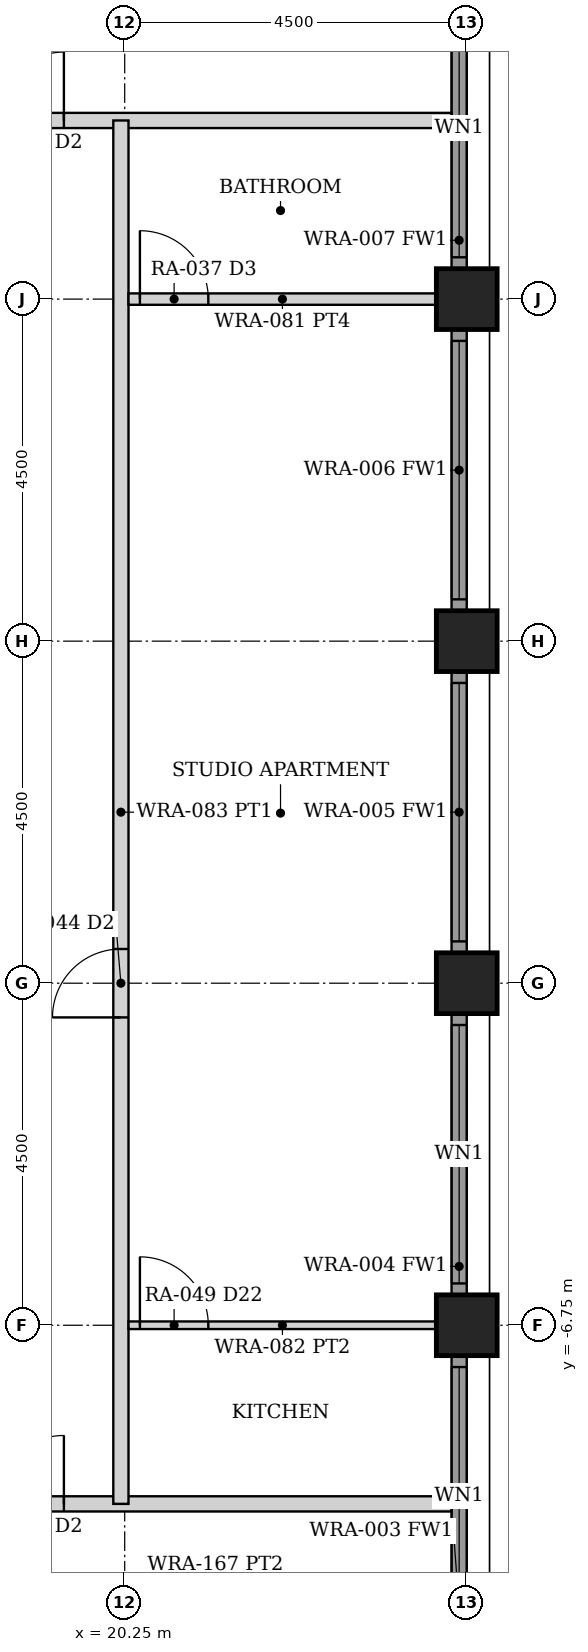
"""IFC4 building model, lengths in metres.
Left out: names, types, materials, properties, quantities, classifications, styles, units other than length and angle.
Written with IfcOpenShell. Run it as: python <this file> out.ifc"""

import sys

from ifc_helpers import new_model, si_unit, direction, frame, frame_2d, origin, origin_2d, place, context, subcontext, project, spatial, rectangle, hollow_rectangle, extrude, element, fill, save


model = new_model("IFC4")
c1 = context("Model", 3, precision=1e-05, world=origin(), true_north=direction((0.0, 1.0)))
c2 = subcontext(c1, "Body", "Model", "MODEL_VIEW")
j1 = project(units=[si_unit("LENGTHUNIT", "METRE"), si_unit("PLANEANGLEUNIT", "RADIAN")], contexts=[c1])
p1 = place(None, origin())
s1 = spatial("IfcSite", under=j1, at=p1, CompositionType="ELEMENT")
p2 = place(p1, origin())
s2 = spatial("IfcBuilding", under=s1, at=p2, CompositionType="ELEMENT")
p3 = place(p2, frame((0.0, 0.0, 30.0)))
s3 = spatial("IfcBuildingStorey", under=s2, at=p3, CompositionType="ELEMENT", Elevation=30.0)
for number, where, z_axis, x_axis in (
    (1, (24.75, -6.75, 0.0), (0.0, 0.0, 1.0), (1.0, 0.0, 0.0)),
    (2, (24.75, -2.25, 0.0), (0.0, 0.0, 1.0), (1.0, 0.0, 0.0)),
    (3, (24.75, 2.25, 0.0), (0.0, 0.0, 1.0), (1.0, 0.0, 0.0)),
    (4, (24.75, 6.75, 0.0), (0.0, 0.0, 1.0), (1.0, 0.0, 0.0)),
):
    element("IfcColumn", number, at=place(p3, frame(where, z_axis=z_axis, x_axis=x_axis)), inside=s3, PredefinedType="COLUMN", context=c2, shape_type="SweptSolid", body=[
        extrude(hollow_rectangle(XDim=0.8, YDim=0.8, WallThickness=0.08, at=origin_2d()), origin(), (0.0, 0.0, 1.0), 3.5),
    ])
p4 = place(p3, frame((24.65, -10.845, 0.0), z_axis=(0.0, 0.0, 1.0), x_axis=(0.0, 1.0, 0.0)))
e5 = element("IfcWall", 5, at=p4, inside=s3, PredefinedType="SOLIDWALL", context=c2, shape_type="SweptSolid", body=[
    extrude(rectangle(XDim=3.69, YDim=0.2, at=frame_2d((1.845, 0.0))), origin(), (0.0, 0.0, 1.0), 2.379),
])
p5 = place(p4, frame((0.145, 0.0, 0.3)))
e6 = element("IfcOpeningElement", 6, at=p5, cuts=e5, PredefinedType="OPENING", context=c2, shape_type="SweptSolid", body=[
    extrude(rectangle(XDim=3.4, YDim=1.929, at=frame_2d((1.7, 0.964))), frame((0.0, 0.11, 0.0), z_axis=(0.0, -1.0, 0.0), x_axis=(1.0, 0.0, 0.0)), (0.0, 0.0, 1.0), 0.22),
])
p6 = place(p3, frame((24.65, -6.345, 0.0), z_axis=(0.0, 0.0, 1.0), x_axis=(0.0, 1.0, 0.0)))
e7 = element("IfcWall", 7, at=p6, inside=s3, PredefinedType="SOLIDWALL", context=c2, shape_type="SweptSolid", body=[
    extrude(rectangle(XDim=3.69, YDim=0.2, at=frame_2d((1.845, 0.0))), origin(), (0.0, 0.0, 1.0), 2.379),
])
p7 = place(p6, frame((0.145, 0.0, 0.3)))
e8 = element("IfcOpeningElement", 8, at=p7, cuts=e7, PredefinedType="OPENING", context=c2, shape_type="SweptSolid", body=[
    extrude(rectangle(XDim=3.4, YDim=1.929, at=frame_2d((1.7, 0.964))), frame((0.0, 0.11, 0.0), z_axis=(0.0, -1.0, 0.0), x_axis=(1.0, 0.0, 0.0)), (0.0, 0.0, 1.0), 0.22),
])
p8 = place(p3, frame((24.65, -1.845, 0.0), z_axis=(0.0, 0.0, 1.0), x_axis=(0.0, 1.0, 0.0)))
e9 = element("IfcWall", 9, at=p8, inside=s3, PredefinedType="SOLIDWALL", context=c2, shape_type="SweptSolid", body=[
    extrude(rectangle(XDim=3.69, YDim=0.2, at=frame_2d((1.845, 0.0))), origin(), (0.0, 0.0, 1.0), 2.379),
])
p9 = place(p8, frame((0.145, 0.0, 0.3)))
e10 = element("IfcOpeningElement", 10, at=p9, cuts=e9, PredefinedType="OPENING", context=c2, shape_type="SweptSolid", body=[
    extrude(rectangle(XDim=3.4, YDim=1.929, at=frame_2d((1.7, 0.964))), frame((0.0, 0.11, 0.0), z_axis=(0.0, -1.0, 0.0), x_axis=(1.0, 0.0, 0.0)), (0.0, 0.0, 1.0), 0.22),
])
p10 = place(p3, frame((24.65, 2.655, 0.0), z_axis=(0.0, 0.0, 1.0), x_axis=(0.0, 1.0, 0.0)))
e11 = element("IfcWall", 11, at=p10, inside=s3, PredefinedType="SOLIDWALL", context=c2, shape_type="SweptSolid", body=[
    extrude(rectangle(XDim=3.69, YDim=0.2, at=frame_2d((1.845, 0.0))), origin(), (0.0, 0.0, 1.0), 2.379),
])
p11 = place(p10, frame((0.145, 0.0, 0.3)))
e12 = element("IfcOpeningElement", 12, at=p11, cuts=e11, PredefinedType="OPENING", context=c2, shape_type="SweptSolid", body=[
    extrude(rectangle(XDim=3.4, YDim=1.929, at=frame_2d((1.7, 0.964))), frame((0.0, 0.11, 0.0), z_axis=(0.0, -1.0, 0.0), x_axis=(1.0, 0.0, 0.0)), (0.0, 0.0, 1.0), 0.22),
])
p12 = place(p3, frame((24.65, 7.155, 0.0), z_axis=(0.0, 0.0, 1.0), x_axis=(0.0, 1.0, 0.0)))
e13 = element("IfcWall", 13, at=p12, inside=s3, PredefinedType="SOLIDWALL", context=c2, shape_type="SweptSolid", body=[
    extrude(rectangle(XDim=3.69, YDim=0.2, at=frame_2d((1.845, 0.0))), origin(), (0.0, 0.0, 1.0), 2.379),
])
p13 = place(p12, frame((0.145, 0.0, 0.3)))
e14 = element("IfcOpeningElement", 14, at=p13, cuts=e13, PredefinedType="OPENING", context=c2, shape_type="SweptSolid", body=[
    extrude(rectangle(XDim=3.4, YDim=1.929, at=frame_2d((1.7, 0.964))), frame((0.0, 0.11, 0.0), z_axis=(0.0, -1.0, 0.0), x_axis=(1.0, 0.0, 0.0)), (0.0, 0.0, 1.0), 0.22),
])
p14 = place(p3, frame((-24.55, 9.1, 0.0), z_axis=(0.0, 0.0, 1.0), x_axis=(1.0, 0.0, 0.0)))
e15 = element("IfcWall", 15, at=p14, inside=s3, PredefinedType="PARTITIONING", context=c2, shape_type="SweptSolid", body=[
    extrude(rectangle(XDim=49.1, YDim=0.2, at=frame_2d((24.55, 0.0))), origin(), (0.0, 0.0, 1.0), 2.373),
])
p15 = place(p14, frame((5.1, 0.0, 0.0)))
e16 = element("IfcOpeningElement", 16, at=p15, cuts=e15, PredefinedType="OPENING", context=c2, shape_type="SweptSolid", body=[
    extrude(rectangle(XDim=0.9, YDim=2.1, at=frame_2d((0.45, 1.05))), frame((0.0, 0.11, 0.0), z_axis=(0.0, -1.0, 0.0), x_axis=(1.0, 0.0, 0.0)), (0.0, 0.0, 1.0), 0.22),
])
p16 = place(p14, frame((9.0, 0.0, 0.0)))
e17 = element("IfcOpeningElement", 17, at=p16, cuts=e15, PredefinedType="OPENING", context=c2, shape_type="SweptSolid", body=[
    extrude(rectangle(XDim=0.9, YDim=2.1, at=frame_2d((0.45, 1.05))), frame((0.0, 0.11, 0.0), z_axis=(0.0, -1.0, 0.0), x_axis=(1.0, 0.0, 0.0)), (0.0, 0.0, 1.0), 0.22),
])
p17 = place(p14, frame((13.5, 0.0, 0.0)))
e18 = element("IfcOpeningElement", 18, at=p17, cuts=e15, PredefinedType="OPENING", context=c2, shape_type="SweptSolid", body=[
    extrude(rectangle(XDim=0.9, YDim=2.1, at=frame_2d((0.45, 1.05))), frame((0.0, 0.11, 0.0), z_axis=(0.0, -1.0, 0.0), x_axis=(1.0, 0.0, 0.0)), (0.0, 0.0, 1.0), 0.22),
])
p18 = place(p14, frame((18.0, 0.0, 0.0)))
e19 = element("IfcOpeningElement", 19, at=p18, cuts=e15, PredefinedType="OPENING", context=c2, shape_type="SweptSolid", body=[
    extrude(rectangle(XDim=0.9, YDim=2.1, at=frame_2d((0.45, 1.05))), frame((0.0, 0.11, 0.0), z_axis=(0.0, -1.0, 0.0), x_axis=(1.0, 0.0, 0.0)), (0.0, 0.0, 1.0), 0.22),
])
p19 = place(p14, frame((22.5, 0.0, 0.0)))
e20 = element("IfcOpeningElement", 20, at=p19, cuts=e15, PredefinedType="OPENING", context=c2, shape_type="SweptSolid", body=[
    extrude(rectangle(XDim=0.9, YDim=2.1, at=frame_2d((0.45, 1.05))), frame((0.0, 0.11, 0.0), z_axis=(0.0, -1.0, 0.0), x_axis=(1.0, 0.0, 0.0)), (0.0, 0.0, 1.0), 0.22),
])
p20 = place(p14, frame((27.0, 0.0, 0.0)))
e21 = element("IfcOpeningElement", 21, at=p20, cuts=e15, PredefinedType="OPENING", context=c2, shape_type="SweptSolid", body=[
    extrude(rectangle(XDim=0.9, YDim=2.1, at=frame_2d((0.45, 1.05))), frame((0.0, 0.11, 0.0), z_axis=(0.0, -1.0, 0.0), x_axis=(1.0, 0.0, 0.0)), (0.0, 0.0, 1.0), 0.22),
])
p21 = place(p14, frame((31.5, 0.0, 0.0)))
e22 = element("IfcOpeningElement", 22, at=p21, cuts=e15, PredefinedType="OPENING", context=c2, shape_type="SweptSolid", body=[
    extrude(rectangle(XDim=0.9, YDim=2.1, at=frame_2d((0.45, 1.05))), frame((0.0, 0.11, 0.0), z_axis=(0.0, -1.0, 0.0), x_axis=(1.0, 0.0, 0.0)), (0.0, 0.0, 1.0), 0.22),
])
p22 = place(p14, frame((36.0, 0.0, 0.0)))
e23 = element("IfcOpeningElement", 23, at=p22, cuts=e15, PredefinedType="OPENING", context=c2, shape_type="SweptSolid", body=[
    extrude(rectangle(XDim=0.9, YDim=2.1, at=frame_2d((0.45, 1.05))), frame((0.0, 0.11, 0.0), z_axis=(0.0, -1.0, 0.0), x_axis=(1.0, 0.0, 0.0)), (0.0, 0.0, 1.0), 0.22),
])
p23 = place(p14, frame((43.1, 0.0, 0.0)))
e24 = element("IfcOpeningElement", 24, at=p23, cuts=e15, PredefinedType="OPENING", context=c2, shape_type="SweptSolid", body=[
    extrude(rectangle(XDim=0.9, YDim=2.1, at=frame_2d((0.45, 1.05))), frame((0.0, 0.11, 0.0), z_axis=(0.0, -1.0, 0.0), x_axis=(1.0, 0.0, 0.0)), (0.0, 0.0, 1.0), 0.22),
])
p24 = place(p3, frame((-24.55, -9.1, 0.0), z_axis=(0.0, 0.0, 1.0), x_axis=(1.0, 0.0, 0.0)))
e25 = element("IfcWall", 25, at=p24, inside=s3, PredefinedType="PARTITIONING", context=c2, shape_type="SweptSolid", body=[
    extrude(rectangle(XDim=49.1, YDim=0.2, at=frame_2d((24.55, 0.0))), origin(), (0.0, 0.0, 1.0), 2.373),
])
p25 = place(p24, frame((5.1, 0.0, 0.0)))
e26 = element("IfcOpeningElement", 26, at=p25, cuts=e25, PredefinedType="OPENING", context=c2, shape_type="SweptSolid", body=[
    extrude(rectangle(XDim=0.9, YDim=2.1, at=frame_2d((0.45, 1.05))), frame((0.0, 0.11, 0.0), z_axis=(0.0, -1.0, 0.0), x_axis=(1.0, 0.0, 0.0)), (0.0, 0.0, 1.0), 0.22),
])
p26 = place(p24, frame((9.0, 0.0, 0.0)))
e27 = element("IfcOpeningElement", 27, at=p26, cuts=e25, PredefinedType="OPENING", context=c2, shape_type="SweptSolid", body=[
    extrude(rectangle(XDim=0.9, YDim=2.1, at=frame_2d((0.45, 1.05))), frame((0.0, 0.11, 0.0), z_axis=(0.0, -1.0, 0.0), x_axis=(1.0, 0.0, 0.0)), (0.0, 0.0, 1.0), 0.22),
])
p27 = place(p24, frame((13.5, 0.0, 0.0)))
e28 = element("IfcOpeningElement", 28, at=p27, cuts=e25, PredefinedType="OPENING", context=c2, shape_type="SweptSolid", body=[
    extrude(rectangle(XDim=0.9, YDim=2.1, at=frame_2d((0.45, 1.05))), frame((0.0, 0.11, 0.0), z_axis=(0.0, -1.0, 0.0), x_axis=(1.0, 0.0, 0.0)), (0.0, 0.0, 1.0), 0.22),
])
p28 = place(p24, frame((18.0, 0.0, 0.0)))
e29 = element("IfcOpeningElement", 29, at=p28, cuts=e25, PredefinedType="OPENING", context=c2, shape_type="SweptSolid", body=[
    extrude(rectangle(XDim=0.9, YDim=2.1, at=frame_2d((0.45, 1.05))), frame((0.0, 0.11, 0.0), z_axis=(0.0, -1.0, 0.0), x_axis=(1.0, 0.0, 0.0)), (0.0, 0.0, 1.0), 0.22),
])
p29 = place(p24, frame((22.5, 0.0, 0.0)))
e30 = element("IfcOpeningElement", 30, at=p29, cuts=e25, PredefinedType="OPENING", context=c2, shape_type="SweptSolid", body=[
    extrude(rectangle(XDim=0.9, YDim=2.1, at=frame_2d((0.45, 1.05))), frame((0.0, 0.11, 0.0), z_axis=(0.0, -1.0, 0.0), x_axis=(1.0, 0.0, 0.0)), (0.0, 0.0, 1.0), 0.22),
])
p30 = place(p24, frame((27.0, 0.0, 0.0)))
e31 = element("IfcOpeningElement", 31, at=p30, cuts=e25, PredefinedType="OPENING", context=c2, shape_type="SweptSolid", body=[
    extrude(rectangle(XDim=0.9, YDim=2.1, at=frame_2d((0.45, 1.05))), frame((0.0, 0.11, 0.0), z_axis=(0.0, -1.0, 0.0), x_axis=(1.0, 0.0, 0.0)), (0.0, 0.0, 1.0), 0.22),
])
p31 = place(p24, frame((31.5, 0.0, 0.0)))
e32 = element("IfcOpeningElement", 32, at=p31, cuts=e25, PredefinedType="OPENING", context=c2, shape_type="SweptSolid", body=[
    extrude(rectangle(XDim=0.9, YDim=2.1, at=frame_2d((0.45, 1.05))), frame((0.0, 0.11, 0.0), z_axis=(0.0, -1.0, 0.0), x_axis=(1.0, 0.0, 0.0)), (0.0, 0.0, 1.0), 0.22),
])
p32 = place(p24, frame((36.0, 0.0, 0.0)))
e33 = element("IfcOpeningElement", 33, at=p32, cuts=e25, PredefinedType="OPENING", context=c2, shape_type="SweptSolid", body=[
    extrude(rectangle(XDim=0.9, YDim=2.1, at=frame_2d((0.45, 1.05))), frame((0.0, 0.11, 0.0), z_axis=(0.0, -1.0, 0.0), x_axis=(1.0, 0.0, 0.0)), (0.0, 0.0, 1.0), 0.22),
])
p33 = place(p24, frame((43.1, 0.0, 0.0)))
e34 = element("IfcOpeningElement", 34, at=p33, cuts=e25, PredefinedType="OPENING", context=c2, shape_type="SweptSolid", body=[
    extrude(rectangle(XDim=0.9, YDim=2.1, at=frame_2d((0.45, 1.05))), frame((0.0, 0.11, 0.0), z_axis=(0.0, -1.0, 0.0), x_axis=(1.0, 0.0, 0.0)), (0.0, 0.0, 1.0), 0.22),
])
p34 = place(p3, frame((20.2, -9.1, 0.0), z_axis=(0.0, 0.0, 1.0), x_axis=(0.0, 1.0, 0.0)))
e35 = element("IfcWall", 35, at=p34, inside=s3, PredefinedType="PARTITIONING", context=c2, shape_type="SweptSolid", body=[
    extrude(rectangle(XDim=18.2, YDim=0.2, at=frame_2d((9.1, 0.0))), origin(), (0.0, 0.0, 1.0), 2.373),
])
p35 = place(p34, frame((6.4, 0.0, 0.0)))
e36 = element("IfcOpeningElement", 36, at=p35, cuts=e35, PredefinedType="OPENING", context=c2, shape_type="SweptSolid", body=[
    extrude(rectangle(XDim=0.9, YDim=2.1, at=frame_2d((0.45, 1.05))), frame((0.0, 0.11, 0.0), z_axis=(0.0, -1.0, 0.0), x_axis=(1.0, 0.0, 0.0)), (0.0, 0.0, 1.0), 0.22),
])
p36 = place(p3, frame((20.3, -6.75, 0.0), z_axis=(0.0, 0.0, 1.0), x_axis=(1.0, 0.0, 0.0)))
e37 = element("IfcWall", 37, at=p36, inside=s3, PredefinedType="PARTITIONING", context=c2, shape_type="SweptSolid", body=[
    extrude(rectangle(XDim=4.05, YDim=0.1, at=frame_2d((2.025, 0.0))), origin(), (0.0, 0.0, 1.0), 2.373),
])
p37 = place(p36, frame((0.15, 0.0, 0.0)))
e38 = element("IfcOpeningElement", 38, at=p37, cuts=e37, PredefinedType="OPENING", context=c2, shape_type="SweptSolid", body=[
    extrude(rectangle(XDim=0.9, YDim=2.1, at=frame_2d((0.45, 1.05))), frame((0.0, 0.06, 0.0), z_axis=(0.0, -1.0, 0.0), x_axis=(1.0, 0.0, 0.0)), (0.0, 0.0, 1.0), 0.12),
])
p38 = place(p3, frame((20.3, 6.75, 0.0), z_axis=(0.0, 0.0, 1.0), x_axis=(1.0, 0.0, 0.0)))
e39 = element("IfcWall", 39, at=p38, inside=s3, PredefinedType="PARTITIONING", context=c2, shape_type="SweptSolid", body=[
    extrude(rectangle(XDim=4.05, YDim=0.15, at=frame_2d((2.025, 0.0))), origin(), (0.0, 0.0, 1.0), 2.373),
])
p39 = place(p38, frame((0.15, 0.0, 0.0)))
e40 = element("IfcOpeningElement", 40, at=p39, cuts=e39, PredefinedType="OPENING", context=c2, shape_type="SweptSolid", body=[
    extrude(rectangle(XDim=0.9, YDim=2.1, at=frame_2d((0.45, 1.05))), frame((0.0, 0.085, 0.0), z_axis=(0.0, -1.0, 0.0), x_axis=(1.0, 0.0, 0.0)), (0.0, 0.0, 1.0), 0.17),
])
p40 = place(p5, origin())
e41 = element("IfcWindow", 41, at=p40, inside=s3, PartitioningType="SINGLE_PANEL", PredefinedType="WINDOW", context=c2, shape_type="SweptSolid", body=[
    extrude(rectangle(XDim=3.4, YDim=1.929, at=frame_2d((1.7, 0.964))), frame((0.0, 0.03, 0.0), z_axis=(0.0, -1.0, 0.0), x_axis=(1.0, 0.0, 0.0)), (0.0, 0.0, 1.0), 0.06),
])
fill(e6, e41)
p41 = place(p7, origin())
e42 = element("IfcWindow", 42, at=p41, inside=s3, PartitioningType="SINGLE_PANEL", PredefinedType="WINDOW", context=c2, shape_type="SweptSolid", body=[
    extrude(rectangle(XDim=3.4, YDim=1.929, at=frame_2d((1.7, 0.964))), frame((0.0, 0.03, 0.0), z_axis=(0.0, -1.0, 0.0), x_axis=(1.0, 0.0, 0.0)), (0.0, 0.0, 1.0), 0.06),
])
fill(e8, e42)
p42 = place(p9, origin())
e43 = element("IfcWindow", 43, at=p42, inside=s3, PartitioningType="SINGLE_PANEL", PredefinedType="WINDOW", context=c2, shape_type="SweptSolid", body=[
    extrude(rectangle(XDim=3.4, YDim=1.929, at=frame_2d((1.7, 0.964))), frame((0.0, 0.03, 0.0), z_axis=(0.0, -1.0, 0.0), x_axis=(1.0, 0.0, 0.0)), (0.0, 0.0, 1.0), 0.06),
])
fill(e10, e43)
p43 = place(p11, origin())
e44 = element("IfcWindow", 44, at=p43, inside=s3, PartitioningType="SINGLE_PANEL", PredefinedType="WINDOW", context=c2, shape_type="SweptSolid", body=[
    extrude(rectangle(XDim=3.4, YDim=1.929, at=frame_2d((1.7, 0.964))), frame((0.0, 0.03, 0.0), z_axis=(0.0, -1.0, 0.0), x_axis=(1.0, 0.0, 0.0)), (0.0, 0.0, 1.0), 0.06),
])
fill(e12, e44)
p44 = place(p13, origin())
e45 = element("IfcWindow", 45, at=p44, inside=s3, PartitioningType="SINGLE_PANEL", PredefinedType="WINDOW", context=c2, shape_type="SweptSolid", body=[
    extrude(rectangle(XDim=3.4, YDim=1.929, at=frame_2d((1.7, 0.964))), frame((0.0, 0.03, 0.0), z_axis=(0.0, -1.0, 0.0), x_axis=(1.0, 0.0, 0.0)), (0.0, 0.0, 1.0), 0.06),
])
fill(e14, e45)
p45 = place(p23, origin())
e46 = element("IfcDoor", 46, at=p45, inside=s3, OperationType="SINGLE_SWING_RIGHT", PredefinedType="DOOR", context=c2, shape_type="SweptSolid", body=[
    extrude(rectangle(XDim=0.9, YDim=2.1, at=frame_2d((0.45, 1.05))), frame((0.0, 0.025, 0.0), z_axis=(0.0, -1.0, 0.0), x_axis=(1.0, 0.0, 0.0)), (0.0, 0.0, 1.0), 0.05),
])
fill(e24, e46)
p46 = place(p33, origin())
e47 = element("IfcDoor", 47, at=p46, inside=s3, OperationType="SINGLE_SWING_RIGHT", PredefinedType="DOOR", context=c2, shape_type="SweptSolid", body=[
    extrude(rectangle(XDim=0.9, YDim=2.1, at=frame_2d((0.45, 1.05))), frame((0.0, 0.025, 0.0), z_axis=(0.0, -1.0, 0.0), x_axis=(1.0, 0.0, 0.0)), (0.0, 0.0, 1.0), 0.05),
])
fill(e34, e47)
p47 = place(p37, origin())
e48 = element("IfcDoor", 48, at=p47, inside=s3, OperationType="SINGLE_SWING_LEFT", PredefinedType="DOOR", context=c2, shape_type="SweptSolid", body=[
    extrude(rectangle(XDim=0.9, YDim=2.1, at=frame_2d((0.45, 1.05))), frame((0.0, 0.025, 0.0), z_axis=(0.0, -1.0, 0.0), x_axis=(1.0, 0.0, 0.0)), (0.0, 0.0, 1.0), 0.05),
])
fill(e38, e48)
p48 = place(p39, origin())
e49 = element("IfcDoor", 49, at=p48, inside=s3, OperationType="SINGLE_SWING_LEFT", PredefinedType="DOOR", context=c2, shape_type="SweptSolid", body=[
    extrude(rectangle(XDim=0.9, YDim=2.1, at=frame_2d((0.45, 1.05))), frame((0.0, 0.025, 0.0), z_axis=(0.0, -1.0, 0.0), x_axis=(1.0, 0.0, 0.0)), (0.0, 0.0, 1.0), 0.05),
])
fill(e40, e49)
p49 = place(p35, origin())
e50 = element("IfcDoor", 50, at=p49, inside=s3, OperationType="SINGLE_SWING_LEFT", PredefinedType="DOOR", context=c2, shape_type="SweptSolid", body=[
    extrude(rectangle(XDim=0.9, YDim=2.1, at=frame_2d((0.45, 1.05))), frame((0.0, 0.025, 0.0), z_axis=(0.0, -1.0, 0.0), x_axis=(1.0, 0.0, 0.0)), (0.0, 0.0, 1.0), 0.05),
])
fill(e36, e50)
save(model, sys.argv[1])
